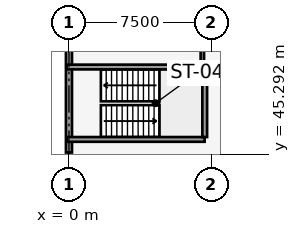
"""IFC4 building model, lengths in metres.
Left out: names, types, materials, properties, quantities, classifications, styles, units other than length and angle.
Written with IfcOpenShell. Run it as: python <this file> out.ifc"""

import sys

from ifc_helpers import new_model, si_unit, direction, frame, frame_2d, origin, origin_2d, place, context, subcontext, project, spatial, rectangle, circle, extrude, element, fill, save


model = new_model("IFC4")
c1 = context("Model", 3, precision=1e-05, world=origin(), true_north=direction((0.0, 1.0)))
c2 = subcontext(c1, "Body", "Model", "MODEL_VIEW")
j1 = project(units=[si_unit("LENGTHUNIT", "METRE"), si_unit("PLANEANGLEUNIT", "RADIAN")], contexts=[c1])
p1 = place(None, origin())
s1 = spatial("IfcSite", under=j1, at=p1, CompositionType="ELEMENT")
p2 = place(p1, origin())
s2 = spatial("IfcBuilding", under=s1, at=p2, CompositionType="ELEMENT")
p3 = place(p2, frame((0.0, 0.0, 4.8)))
s3 = spatial("IfcBuildingStorey", under=s2, at=p3, CompositionType="ELEMENT", Elevation=4.8)
p4 = place(p3, frame((0.0, 45.0, 0.0), z_axis=(0.0, 0.0, 1.0), x_axis=(1.0, 0.0, 0.0)))
e1 = element("IfcColumn", 1, at=p4, inside=s3, PredefinedType="COLUMN", context=c2, shape_type="SweptSolid", body=[
    extrude(circle(Radius=0.375, at=origin_2d()), origin(), (0.0, 0.0, 1.0), 4.2),
])
p5 = place(p3, frame((0.0, 45.385, 0.0), z_axis=(0.0, 0.0, 1.0), x_axis=(0.0, 1.0, 0.0)))
e2 = element("IfcWall", 2, at=p5, inside=s3, PredefinedType="SOLIDWALL", context=c2, shape_type="SweptSolid", body=[
    extrude(rectangle(XDim=6.73, YDim=0.32, at=frame_2d((3.365, 0.0))), origin(), (0.0, 0.0, 1.0), 2.89),
])
p6 = place(p3, frame((-0.12, 46.075, 0.0), z_axis=(0.0, 0.0, 1.0), x_axis=(1.0, 0.0, 0.0)))
e3 = element("IfcWall", 3, at=p6, inside=s3, PredefinedType="SOLIDWALL", context=c2, shape_type="SweptSolid", body=[
    extrude(rectangle(XDim=7.26, YDim=0.25, at=frame_2d((3.63, 0.0))), origin(), (0.0, 0.0, 1.0), 3.92),
])
p7 = place(p6, frame((0.56, 0.0, 0.0)))
e4 = element("IfcOpeningElement", 4, at=p7, cuts=e3, PredefinedType="OPENING", context=c2, shape_type="SweptSolid", body=[
    extrude(rectangle(XDim=1.1, YDim=2.15, at=frame_2d((0.55, 1.075))), frame((0.0, 0.135, 0.0), z_axis=(0.0, -1.0, 0.0), x_axis=(1.0, 0.0, 0.0)), (0.0, 0.0, 1.0), 0.27),
])
p8 = place(p3, frame((-0.12, 49.885, 0.0), z_axis=(0.0, 0.0, 1.0), x_axis=(1.0, 0.0, 0.0)))
e5 = element("IfcWall", 5, at=p8, inside=s3, PredefinedType="SOLIDWALL", context=c2, shape_type="SweptSolid", body=[
    extrude(rectangle(XDim=7.26, YDim=0.25, at=frame_2d((3.63, 0.0))), origin(), (0.0, 0.0, 1.0), 3.92),
])
p9 = place(p3, frame((7.145, 46.2, 0.0), z_axis=(0.0, 0.0, 1.0), x_axis=(0.0, 1.0, 0.0)))
e6 = element("IfcWall", 6, at=p9, inside=s3, PredefinedType="SOLIDWALL", context=c2, shape_type="SweptSolid", body=[
    extrude(rectangle(XDim=3.56, YDim=0.25, at=frame_2d((1.78, 0.0))), origin(), (0.0, 0.0, 1.0), 3.92),
])
p10 = place(p3, frame((7.02, 50.024, 0.0), z_axis=(0.0, 0.0, 1.0), x_axis=(0.0, 1.0, 0.0)))
e7 = element("IfcWall", 7, at=p10, inside=s3, PredefinedType="PARTITIONING", context=c2, shape_type="SweptSolid", body=[
    extrude(rectangle(XDim=2.364, YDim=0.18, at=frame_2d((1.182, 0.0))), origin(), (0.0, 0.0, 1.0), 2.89),
])
p11 = place(p7, origin())
e8 = element("IfcDoor", 8, at=p11, inside=s3, OperationType="SINGLE_SWING_LEFT", PredefinedType="DOOR", context=c2, shape_type="SweptSolid", body=[
    extrude(rectangle(XDim=1.1, YDim=2.15, at=frame_2d((0.55, 1.075))), frame((0.0, 0.025, 0.0), z_axis=(0.0, -1.0, 0.0), x_axis=(1.0, 0.0, 0.0)), (0.0, 0.0, 1.0), 0.05),
])
fill(e4, e8)
save(model, sys.argv[1])
